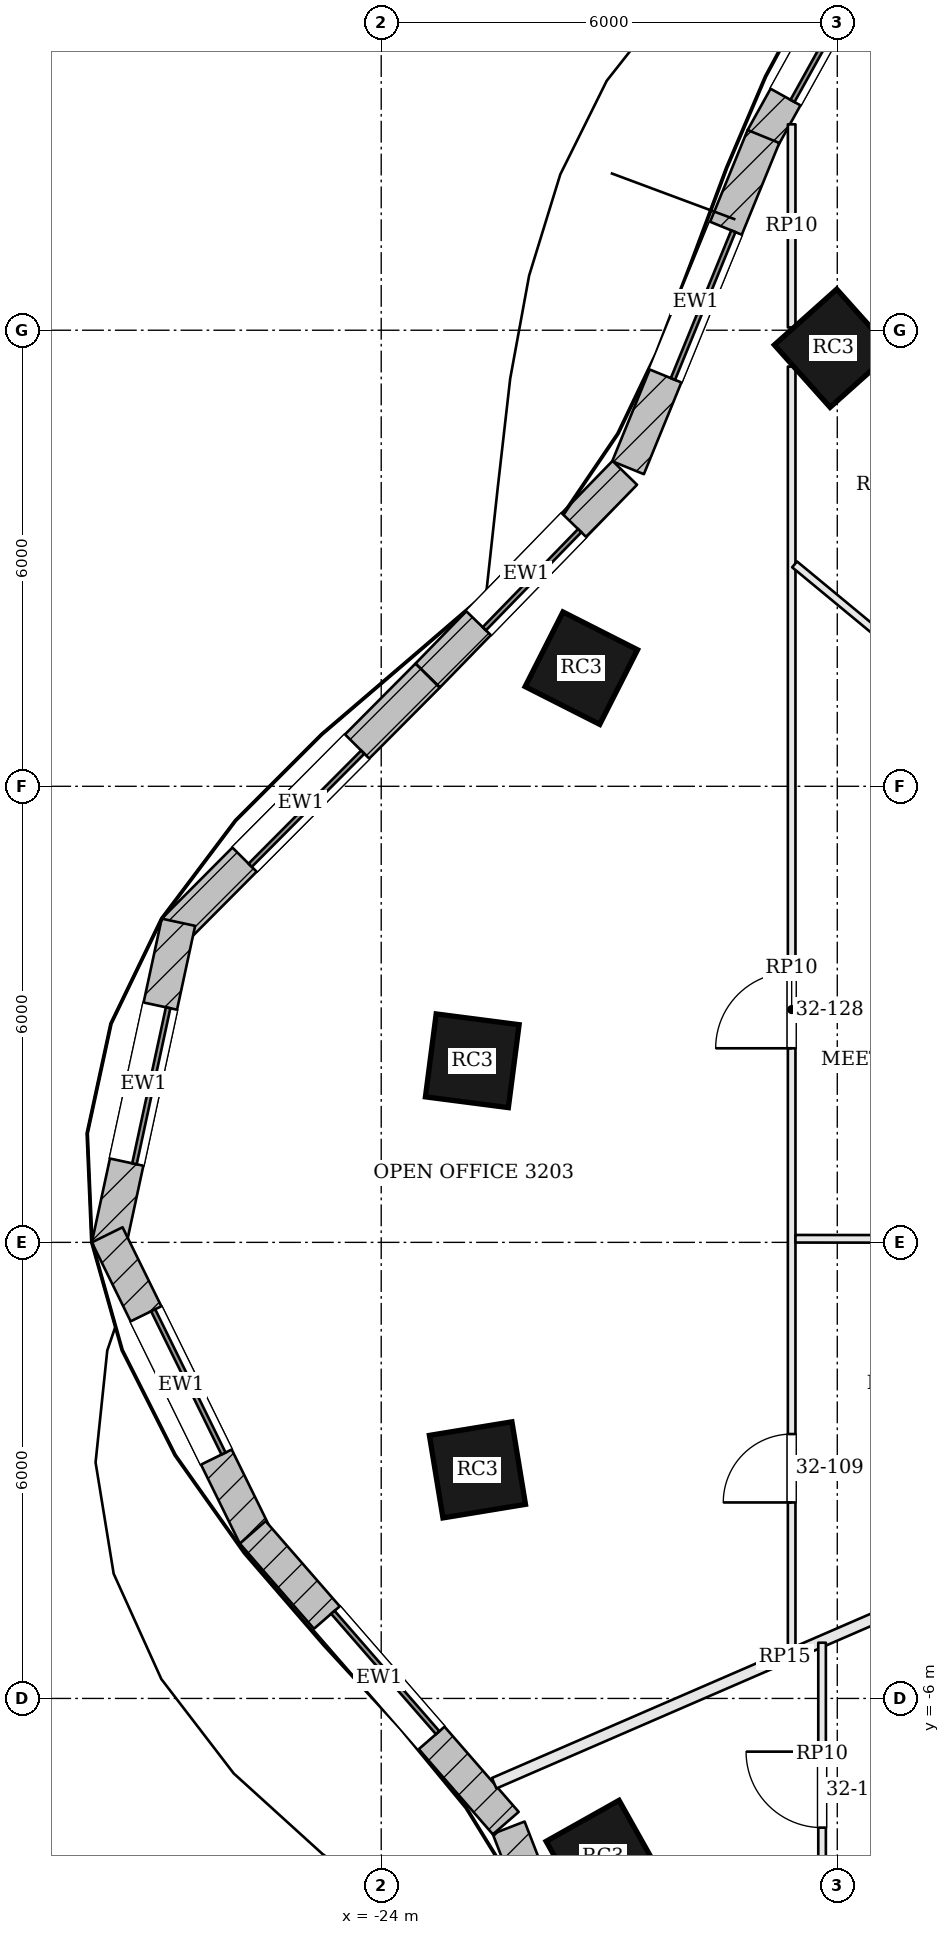
"""IFC4 building model, lengths in metres.
Left out: names, types, materials, properties, quantities, classifications, styles, units other than length and angle.
Written with IfcOpenShell. Run it as: python <this file> out.ifc"""

import sys

from ifc_helpers import new_model, si_unit, direction, frame, frame_2d, origin, origin_2d, place, context, subcontext, project, spatial, rectangle, extrude, element, fill, save


model = new_model("IFC4")
c1 = context("Model", 3, precision=1e-05, world=origin(), true_north=direction((0.0, 1.0)))
c2 = subcontext(c1, "Body", "Model", "MODEL_VIEW")
j1 = project(units=[si_unit("LENGTHUNIT", "METRE"), si_unit("PLANEANGLEUNIT", "RADIAN")], contexts=[c1])
p1 = place(None, origin())
s1 = spatial("IfcSite", under=j1, at=p1, CompositionType="ELEMENT")
p2 = place(p1, origin())
s2 = spatial("IfcBuilding", under=s1, at=p2, CompositionType="ELEMENT")
p3 = place(p2, frame((0.0, 0.0, 134.4)))
s3 = spatial("IfcBuildingStorey", under=s2, at=p3, CompositionType="ELEMENT", Elevation=134.4)
for number, where, z_axis, x_axis in (
    (1, (-18.051, 11.763, 0.0), (0.0, 0.0, 1.0), (-0.746, -0.666, 0.0)),
    (2, (-21.367, 7.554, 0.0), (0.0, 0.0, 1.0), (-0.452, -0.892, 0.0)),
    (3, (-22.802, 2.389, 0.0), (0.0, 0.0, 1.0), (-0.129, -0.992, 0.0)),
    (4, (-22.734, -2.993, 0.0), (0.0, 0.0, 1.0), (0.162, -0.987, 0.0)),
    (5, (-21.081, -8.09, 0.0), (0.0, 0.0, 1.0), (0.49, -0.872, 0.0)),
):
    element("IfcColumn", number, at=place(p3, frame(where, z_axis=z_axis, x_axis=x_axis)), inside=s3, PredefinedType="COLUMN", context=c2, shape_type="SweptSolid", body=[
        extrude(rectangle(XDim=1.1, YDim=1.1, at=origin_2d()), origin(), (0.0, 0.0, 1.0), 3.9),
    ])
p4 = place(p3, frame((-17.359, 17.447, 0.0), z_axis=(0.0, 0.0, 1.0), x_axis=(-0.485618126214, -0.874171056197, 0.0)))
e6 = element("IfcWall", 6, at=p4, inside=s3, PredefinedType="SOLIDWALL", context=c2, shape_type="SweptSolid", body=[
    extrude(rectangle(XDim=3.343, YDim=0.45, at=frame_2d((1.671, 0.0))), origin(), (0.0, 0.0, 1.0), 3.7),
])
p5 = place(p4, frame((0.621, 0.0, 0.9)))
e7 = element("IfcOpeningElement", 7, at=p5, cuts=e6, PredefinedType="OPENING", context=c2, shape_type="SweptSolid", body=[
    extrude(rectangle(XDim=2.1, YDim=2.3, at=frame_2d((1.05, 1.15))), frame((0.0, 0.235, 0.0), z_axis=(0.0, -1.0, 0.0), x_axis=(1.0, 0.0, 0.0)), (0.0, 0.0, 1.0), 0.47),
])
p6 = place(p3, frame((-18.971, 14.549, 0.0), z_axis=(0.0, 0.0, 1.0), x_axis=(-0.378434936431, -0.925627894398, 0.0)))
e8 = element("IfcWall", 8, at=p6, inside=s3, PredefinedType="SOLIDWALL", context=c2, shape_type="SweptSolid", body=[
    extrude(rectangle(XDim=4.708, YDim=0.45, at=frame_2d((2.354, 0.0))), origin(), (0.0, 0.0, 1.0), 3.7),
])
p7 = place(p6, frame((1.304, 0.0, 0.9)))
e9 = element("IfcOpeningElement", 9, at=p7, cuts=e8, PredefinedType="OPENING", context=c2, shape_type="SweptSolid", body=[
    extrude(rectangle(XDim=2.1, YDim=2.3, at=frame_2d((1.05, 1.15))), frame((0.0, 0.235, 0.0), z_axis=(0.0, -1.0, 0.0), x_axis=(1.0, 0.0, 0.0)), (0.0, 0.0, 1.0), 0.47),
])
p8 = place(p3, frame((-20.796, 10.124, 0.0), z_axis=(0.0, 0.0, 1.0), x_axis=(-0.697121527554, -0.716952980203, 0.0)))
e10 = element("IfcWall", 10, at=p8, inside=s3, PredefinedType="SOLIDWALL", context=c2, shape_type="SweptSolid", body=[
    extrude(rectangle(XDim=3.718, YDim=0.45, at=frame_2d((1.859, 0.0))), origin(), (0.0, 0.0, 1.0), 3.7),
])
p9 = place(p8, frame((0.959, 0.0, 0.9)))
e11 = element("IfcOpeningElement", 11, at=p9, cuts=e10, PredefinedType="OPENING", context=c2, shape_type="SweptSolid", body=[
    extrude(rectangle(XDim=1.8, YDim=2.3, at=frame_2d((0.9, 1.15))), frame((0.0, 0.235, 0.0), z_axis=(0.0, -1.0, 0.0), x_axis=(1.0, 0.0, 0.0)), (0.0, 0.0, 1.0), 0.47),
])
p10 = place(p3, frame((-23.39, 7.456, 0.0), z_axis=(0.0, 0.0, 1.0), x_axis=(-0.705349231702, -0.708859973011, 0.0)))
e12 = element("IfcWall", 12, at=p10, inside=s3, PredefinedType="SOLIDWALL", context=c2, shape_type="SweptSolid", body=[
    extrude(rectangle(XDim=4.729, YDim=0.45, at=frame_2d((2.364, 0.0))), origin(), (0.0, 0.0, 1.0), 3.7),
])
p11 = place(p10, frame((1.314, 0.0, 0.9)))
e13 = element("IfcOpeningElement", 13, at=p11, cuts=e12, PredefinedType="OPENING", context=c2, shape_type="SweptSolid", body=[
    extrude(rectangle(XDim=2.1, YDim=2.3, at=frame_2d((1.05, 1.15))), frame((0.0, 0.235, 0.0), z_axis=(0.0, -1.0, 0.0), x_axis=(1.0, 0.0, 0.0)), (0.0, 0.0, 1.0), 0.47),
])
p12 = place(p3, frame((-26.668, 4.211, 0.0), z_axis=(0.0, 0.0, 1.0), x_axis=(-0.210910311825, -0.977505417052, 0.0)))
e14 = element("IfcWall", 14, at=p12, inside=s3, PredefinedType="SOLIDWALL", context=c2, shape_type="SweptSolid", body=[
    extrude(rectangle(XDim=4.357, YDim=0.45, at=frame_2d((2.178, 0.0))), origin(), (0.0, 0.0, 1.0), 3.7),
])
p13 = place(p12, frame((1.128, 0.0, 0.9)))
e15 = element("IfcOpeningElement", 15, at=p13, cuts=e14, PredefinedType="OPENING", context=c2, shape_type="SweptSolid", body=[
    extrude(rectangle(XDim=2.1, YDim=2.3, at=frame_2d((1.05, 1.15))), frame((0.0, 0.235, 0.0), z_axis=(0.0, -1.0, 0.0), x_axis=(1.0, 0.0, 0.0)), (0.0, 0.0, 1.0), 0.47),
])
p14 = place(p3, frame((-27.605, 0.099, 0.0), z_axis=(0.0, 0.0, 1.0), x_axis=(0.440876526139, -0.897567762734, 0.0)))
e16 = element("IfcWall", 16, at=p14, inside=s3, PredefinedType="SOLIDWALL", context=c2, shape_type="SweptSolid", body=[
    extrude(rectangle(XDim=4.415, YDim=0.45, at=frame_2d((2.208, 0.0))), origin(), (0.0, 0.0, 1.0), 3.7),
])
p15 = place(p14, frame((1.158, 0.0, 0.9)))
e17 = element("IfcOpeningElement", 17, at=p15, cuts=e16, PredefinedType="OPENING", context=c2, shape_type="SweptSolid", body=[
    extrude(rectangle(XDim=2.1, YDim=2.3, at=frame_2d((1.05, 1.15))), frame((0.0, 0.235, 0.0), z_axis=(0.0, -1.0, 0.0), x_axis=(1.0, 0.0, 0.0)), (0.0, 0.0, 1.0), 0.47),
])
p16 = place(p3, frame((-25.691, -3.815, 0.0), z_axis=(0.0, 0.0, 1.0), x_axis=(0.656552883353, -0.754279995334, 0.0)))
e18 = element("IfcWall", 18, at=p16, inside=s3, PredefinedType="SOLIDWALL", context=c2, shape_type="SweptSolid", body=[
    extrude(rectangle(XDim=5.071, YDim=0.45, at=frame_2d((2.536, 0.0))), origin(), (0.0, 0.0, 1.0), 3.7),
])
p17 = place(p16, frame((1.486, 0.0, 0.9)))
e19 = element("IfcOpeningElement", 19, at=p17, cuts=e18, PredefinedType="OPENING", context=c2, shape_type="SweptSolid", body=[
    extrude(rectangle(XDim=2.1, YDim=2.3, at=frame_2d((1.05, 1.15))), frame((0.0, 0.235, 0.0), z_axis=(0.0, -1.0, 0.0), x_axis=(1.0, 0.0, 0.0)), (0.0, 0.0, 1.0), 0.47),
])
p18 = place(p3, frame((-22.323, -7.701, 0.0), z_axis=(0.0, 0.0, 1.0), x_axis=(0.361550075906, -0.932352692178, 0.0)))
e20 = element("IfcWall", 20, at=p18, inside=s3, PredefinedType="SOLIDWALL", context=c2, shape_type="SweptSolid", body=[
    extrude(rectangle(XDim=3.313, YDim=0.45, at=frame_2d((1.657, 0.0))), origin(), (0.0, 0.0, 1.0), 3.7),
])
p19 = place(p18, frame((0.607, 0.0, 0.9)))
e21 = element("IfcOpeningElement", 21, at=p19, cuts=e20, PredefinedType="OPENING", context=c2, shape_type="SweptSolid", body=[
    extrude(rectangle(XDim=2.1, YDim=2.3, at=frame_2d((1.05, 1.15))), frame((0.0, 0.235, 0.0), z_axis=(0.0, -1.0, 0.0), x_axis=(1.0, 0.0, 0.0)), (0.0, 0.0, 1.0), 0.47),
])
p20 = place(p3, frame((-22.514, -7.116, 0.0), z_axis=(0.0, 0.0, 1.0), x_axis=(0.917457618692, 0.397833530392, 0.0)))
e22 = element("IfcWall", 22, at=p20, inside=s3, PredefinedType="PARTITIONING", context=c2, shape_type="SweptSolid", body=[
    extrude(rectangle(XDim=8.333, YDim=0.15, at=frame_2d((4.167, 0.0))), origin(), (0.0, 0.0, 1.0), 3.198),
])
p21 = place(p3, frame((-18.6, -5.397, 0.0), z_axis=(0.0, 0.0, 1.0), x_axis=(0.0, 1.0, 0.0)))
e23 = element("IfcWall", 23, at=p21, inside=s3, PredefinedType="PARTITIONING", context=c2, shape_type="SweptSolid", body=[
    extrude(rectangle(XDim=16.919, YDim=0.1, at=frame_2d((8.459, 0.0))), origin(), (0.0, 0.0, 1.0), 3.184),
])
p22 = place(p21, frame((1.975, 0.0, 0.0)))
e24 = element("IfcOpeningElement", 24, at=p22, cuts=e23, PredefinedType="OPENING", context=c2, shape_type="SweptSolid", body=[
    extrude(rectangle(XDim=0.9, YDim=2.1, at=frame_2d((0.45, 1.05))), frame((0.0, 0.06, 0.0), z_axis=(0.0, -1.0, 0.0), x_axis=(1.0, 0.0, 0.0)), (0.0, 0.0, 1.0), 0.12),
])
p23 = place(p21, frame((7.95, 0.0, 0.0)))
e25 = element("IfcOpeningElement", 25, at=p23, cuts=e23, PredefinedType="OPENING", context=c2, shape_type="SweptSolid", body=[
    extrude(rectangle(XDim=1.0, YDim=2.4, at=frame_2d((0.5, 1.2))), frame((0.0, 0.06, 0.0), z_axis=(0.0, -1.0, 0.0), x_axis=(1.0, 0.0, 0.0)), (0.0, 0.0, 1.0), 0.12),
])
p24 = place(p3, frame((-18.6, 12.037, 0.0), z_axis=(0.0, 0.0, 1.0), x_axis=(0.0, 1.0, 0.0)))
e26 = element("IfcWall", 26, at=p24, inside=s3, PredefinedType="PARTITIONING", context=c2, shape_type="SweptSolid", body=[
    extrude(rectangle(XDim=2.672, YDim=0.1, at=frame_2d((1.336, 0.0))), origin(), (0.0, 0.0, 1.0), 3.184),
])
p25 = place(p3, frame((-14.858, 5.857, 0.0), z_axis=(0.0, 0.0, 1.0), x_axis=(-0.770605931108, 0.637311932213, 0.0)))
e27 = element("IfcWall", 27, at=p25, inside=s3, PredefinedType="PARTITIONING", context=c2, shape_type="SweptSolid", body=[
    extrude(rectangle(XDim=4.806, YDim=0.1, at=frame_2d((2.403, 0.0))), origin(), (0.0, 0.0, 1.0), 3.184),
])
p26 = place(p3, frame((-14.875, 0.043, 0.0), z_axis=(0.0, 0.0, 1.0), x_axis=(-0.999999285062, 0.001195774074, 0.0)))
e28 = element("IfcWall", 28, at=p26, inside=s3, PredefinedType="PARTITIONING", context=c2, shape_type="SweptSolid", body=[
    extrude(rectangle(XDim=3.675, YDim=0.1, at=frame_2d((1.837, 0.0))), origin(), (0.0, 0.0, 1.0), 3.184),
])
p27 = place(p3, frame((-18.2, -8.2, 0.0), z_axis=(0.0, 0.0, 1.0), x_axis=(0.0, 1.0, 0.0)))
e29 = element("IfcWall", 29, at=p27, inside=s3, PredefinedType="PARTITIONING", context=c2, shape_type="SweptSolid", body=[
    extrude(rectangle(XDim=2.933, YDim=0.1, at=frame_2d((1.467, 0.0))), origin(), (0.0, 0.0, 1.0), 3.184),
])
p28 = place(p27, frame((0.5, 0.0, 0.0)))
e30 = element("IfcOpeningElement", 30, at=p28, cuts=e29, PredefinedType="OPENING", context=c2, shape_type="SweptSolid", body=[
    extrude(rectangle(XDim=1.0, YDim=2.1, at=frame_2d((0.5, 1.05))), frame((0.0, 0.06, 0.0), z_axis=(0.0, -1.0, 0.0), x_axis=(1.0, 0.0, 0.0)), (0.0, 0.0, 1.0), 0.12),
])
p29 = place(p5, origin())
e31 = element("IfcWindow", 31, at=p29, inside=s3, PartitioningType="SINGLE_PANEL", PredefinedType="WINDOW", context=c2, shape_type="SweptSolid", body=[
    extrude(rectangle(XDim=2.1, YDim=2.3, at=frame_2d((1.05, 1.15))), frame((0.0, 0.135, 0.0), z_axis=(0.0, -1.0, 0.0), x_axis=(1.0, 0.0, 0.0)), (0.0, 0.0, 1.0), 0.06),
])
fill(e7, e31)
p30 = place(p7, origin())
e32 = element("IfcWindow", 32, at=p30, inside=s3, PartitioningType="SINGLE_PANEL", PredefinedType="WINDOW", context=c2, shape_type="SweptSolid", body=[
    extrude(rectangle(XDim=2.1, YDim=2.3, at=frame_2d((1.05, 1.15))), frame((0.0, 0.135, 0.0), z_axis=(0.0, -1.0, 0.0), x_axis=(1.0, 0.0, 0.0)), (0.0, 0.0, 1.0), 0.06),
])
fill(e9, e32)
p31 = place(p9, origin())
e33 = element("IfcWindow", 33, at=p31, inside=s3, PartitioningType="SINGLE_PANEL", PredefinedType="WINDOW", context=c2, shape_type="SweptSolid", body=[
    extrude(rectangle(XDim=1.8, YDim=2.3, at=frame_2d((0.9, 1.15))), frame((0.0, 0.135, 0.0), z_axis=(0.0, -1.0, 0.0), x_axis=(1.0, 0.0, 0.0)), (0.0, 0.0, 1.0), 0.06),
])
fill(e11, e33)
p32 = place(p11, origin())
e34 = element("IfcWindow", 34, at=p32, inside=s3, PartitioningType="SINGLE_PANEL", PredefinedType="WINDOW", context=c2, shape_type="SweptSolid", body=[
    extrude(rectangle(XDim=2.1, YDim=2.3, at=frame_2d((1.05, 1.15))), frame((0.0, 0.135, 0.0), z_axis=(0.0, -1.0, 0.0), x_axis=(1.0, 0.0, 0.0)), (0.0, 0.0, 1.0), 0.06),
])
fill(e13, e34)
p33 = place(p13, origin())
e35 = element("IfcWindow", 35, at=p33, inside=s3, PartitioningType="SINGLE_PANEL", PredefinedType="WINDOW", context=c2, shape_type="SweptSolid", body=[
    extrude(rectangle(XDim=2.1, YDim=2.3, at=frame_2d((1.05, 1.15))), frame((0.0, 0.135, 0.0), z_axis=(0.0, -1.0, 0.0), x_axis=(1.0, 0.0, 0.0)), (0.0, 0.0, 1.0), 0.06),
])
fill(e15, e35)
p34 = place(p15, origin())
e36 = element("IfcWindow", 36, at=p34, inside=s3, PartitioningType="SINGLE_PANEL", PredefinedType="WINDOW", context=c2, shape_type="SweptSolid", body=[
    extrude(rectangle(XDim=2.1, YDim=2.3, at=frame_2d((1.05, 1.15))), frame((0.0, 0.135, 0.0), z_axis=(0.0, -1.0, 0.0), x_axis=(1.0, 0.0, 0.0)), (0.0, 0.0, 1.0), 0.06),
])
fill(e17, e36)
p35 = place(p17, origin())
e37 = element("IfcWindow", 37, at=p35, inside=s3, PartitioningType="SINGLE_PANEL", PredefinedType="WINDOW", context=c2, shape_type="SweptSolid", body=[
    extrude(rectangle(XDim=2.1, YDim=2.3, at=frame_2d((1.05, 1.15))), frame((0.0, 0.135, 0.0), z_axis=(0.0, -1.0, 0.0), x_axis=(1.0, 0.0, 0.0)), (0.0, 0.0, 1.0), 0.06),
])
fill(e19, e37)
p36 = place(p22, origin())
e38 = element("IfcDoor", 38, at=p36, inside=s3, OperationType="SINGLE_SWING_LEFT", PredefinedType="DOOR", context=c2, shape_type="SweptSolid", body=[
    extrude(rectangle(XDim=0.9, YDim=2.1, at=frame_2d((0.45, 1.05))), frame((0.0, 0.025, 0.0), z_axis=(0.0, -1.0, 0.0), x_axis=(1.0, 0.0, 0.0)), (0.0, 0.0, 1.0), 0.05),
])
fill(e24, e38)
p37 = place(p28, origin())
e39 = element("IfcDoor", 39, at=p37, inside=s3, OperationType="SINGLE_SWING_RIGHT", PredefinedType="DOOR", context=c2, shape_type="SweptSolid", body=[
    extrude(rectangle(XDim=1.0, YDim=2.1, at=frame_2d((0.5, 1.05))), frame((0.0, 0.025, 0.0), z_axis=(0.0, -1.0, 0.0), x_axis=(1.0, 0.0, 0.0)), (0.0, 0.0, 1.0), 0.05),
])
fill(e30, e39)
p38 = place(p23, origin())
e40 = element("IfcDoor", 40, at=p38, inside=s3, OperationType="SINGLE_SWING_LEFT", PredefinedType="DOOR", context=c2, shape_type="SweptSolid", body=[
    extrude(rectangle(XDim=1.0, YDim=2.4, at=frame_2d((0.5, 1.2))), frame((0.0, 0.025, 0.0), z_axis=(0.0, -1.0, 0.0), x_axis=(1.0, 0.0, 0.0)), (0.0, 0.0, 1.0), 0.05),
])
fill(e25, e40)
save(model, sys.argv[1])
